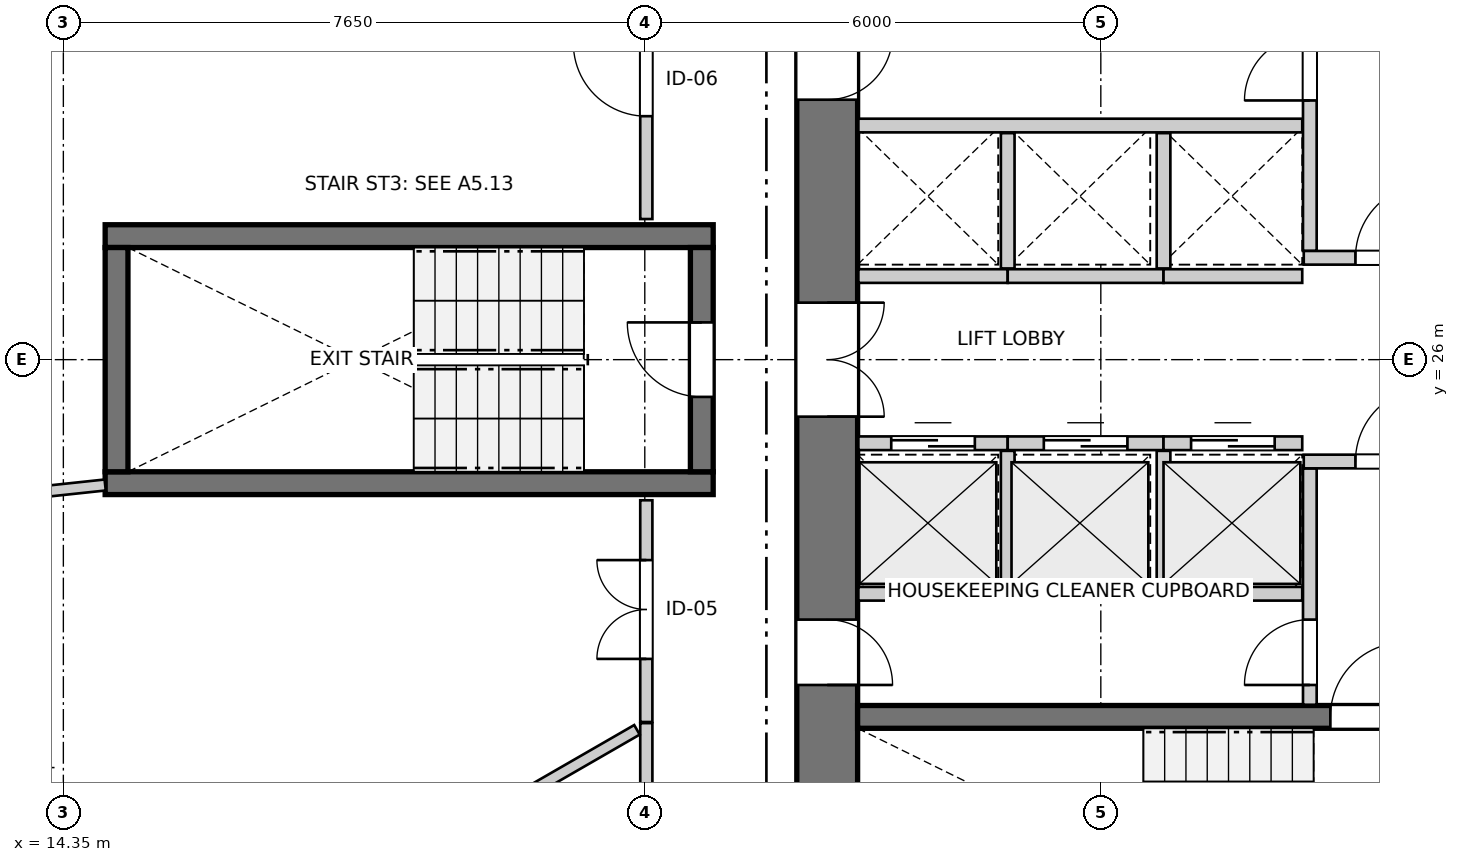
"""IFC4 building model, lengths in metres.
Left out: names, types, materials, properties, quantities, classifications, styles, units other than length and angle.
Written with IfcOpenShell. Run it as: python <this file> out.ifc"""

import sys

from ifc_helpers import new_model, si_unit, direction, frame, frame_2d, origin, place, context, subcontext, project, spatial, rectangle, extrude, source, transform, mapped, element, fill, save


model = new_model("IFC4")
c1 = context("Model", 3, precision=1e-05, world=origin(), true_north=direction((0.0, 1.0)))
c2 = subcontext(c1, "Body", "Model", "MODEL_VIEW")
j1 = project(units=[si_unit("LENGTHUNIT", "METRE"), si_unit("PLANEANGLEUNIT", "RADIAN")], contexts=[c1])
p1 = place(None, origin())
s1 = spatial("IfcSite", under=j1, at=p1, CompositionType="ELEMENT")
p2 = place(p1, origin())
s2 = spatial("IfcBuilding", under=s1, at=p2, CompositionType="ELEMENT")
p3 = place(p2, frame((0.0, 0.0, 14.2)))
s3 = spatial("IfcBuildingStorey", under=s2, at=p3, CompositionType="ELEMENT", Elevation=14.2)
p4 = place(p3, frame((24.4, 33.8, 0.0), z_axis=(0.0, 0.0, 1.0), x_axis=(0.0, -1.0, 0.0)))
e1 = element("IfcWall", 1, at=p4, inside=s3, PredefinedType="SHEAR", context=c2, shape_type="SweptSolid", body=[
    extrude(rectangle(XDim=15.6, YDim=0.8, at=frame_2d((7.8, 0.0))), origin(), (0.0, 0.0, 1.0), 2.94),
])
p5 = place(p4, frame((7.05, 0.0, 0.0)))
e2 = element("IfcOpeningElement", 2, at=p5, cuts=e1, PredefinedType="OPENING", context=c2, shape_type="SweptSolid", body=[
    extrude(rectangle(XDim=1.5, YDim=2.15, at=frame_2d((0.75, 1.075))), frame((0.0, 0.41, 0.0), z_axis=(0.0, -1.0, 0.0), x_axis=(1.0, 0.0, 0.0)), (0.0, 0.0, 1.0), 0.82),
])
p6 = place(p4, frame((3.52, 0.0, 0.0)))
e3 = element("IfcOpeningElement", 3, at=p6, cuts=e1, PredefinedType="OPENING", context=c2, shape_type="SweptSolid", body=[
    extrude(rectangle(XDim=0.86, YDim=2.05, at=frame_2d((0.43, 1.025))), frame((0.0, 0.41, 0.0), z_axis=(0.0, -1.0, 0.0), x_axis=(1.0, 0.0, 0.0)), (0.0, 0.0, 1.0), 0.82),
])
p7 = place(p4, frame((11.22, 0.0, 0.0)))
e4 = element("IfcOpeningElement", 4, at=p7, cuts=e1, PredefinedType="OPENING", context=c2, shape_type="SweptSolid", body=[
    extrude(rectangle(XDim=0.86, YDim=2.05, at=frame_2d((0.43, 1.025))), frame((0.0, 0.41, 0.0), z_axis=(0.0, -1.0, 0.0), x_axis=(1.0, 0.0, 0.0)), (0.0, 0.0, 1.0), 0.82),
])
p8 = place(p3, frame((24.8, 21.3, 0.0), z_axis=(0.0, 0.0, 1.0), x_axis=(1.0, 0.0, 0.0)))
e5 = element("IfcWall", 5, at=p8, inside=s3, PredefinedType="SHEAR", context=c2, shape_type="SweptSolid", body=[
    extrude(rectangle(XDim=11.1, YDim=0.3, at=frame_2d((5.55, 0.0))), origin(), (0.0, 0.0, 1.0), 2.94),
])
p9 = place(p8, frame((6.22, 0.0, 0.0)))
e6 = element("IfcOpeningElement", 6, at=p9, cuts=e5, PredefinedType="OPENING", context=c2, shape_type="SweptSolid", body=[
    extrude(rectangle(XDim=0.98, YDim=2.15, at=frame_2d((0.49, 1.075))), frame((0.0, 0.16, 0.0), z_axis=(0.0, -1.0, 0.0), x_axis=(1.0, 0.0, 0.0)), (0.0, 0.0, 1.0), 0.32),
])
p10 = place(p8, frame((9.15, 0.0, 0.0)))
e7 = element("IfcOpeningElement", 7, at=p10, cuts=e5, PredefinedType="OPENING", context=c2, shape_type="SweptSolid", body=[
    extrude(rectangle(XDim=1.15, YDim=2.15, at=frame_2d((0.575, 1.075))), frame((0.0, 0.16, 0.0), z_axis=(0.0, -1.0, 0.0), x_axis=(1.0, 0.0, 0.0)), (0.0, 0.0, 1.0), 0.32),
])
for number, where, z_axis, x_axis in (
    (8, (14.9, 24.375, 0.0), (0.0, 0.0, 1.0), (1.0, 0.0, 0.0)),
    (9, (22.9, 27.625, 0.0), (0.0, 0.0, 1.0), (-1.0, 0.0, 0.0)),
):
    element("IfcWall", number, at=place(p3, frame(where, z_axis=z_axis, x_axis=x_axis)), inside=s3, PredefinedType="SHEAR", context=c2, shape_type="SweptSolid", body=[
        extrude(rectangle(XDim=8.0, YDim=0.3, at=frame_2d((4.0, 0.0))), origin(), (0.0, 0.0, 1.0), 2.94),
    ])
p11 = place(p3, frame((15.05, 27.475, 0.0), z_axis=(0.0, 0.0, 1.0), x_axis=(0.0, -1.0, 0.0)))
e10 = element("IfcWall", 10, at=p11, inside=s3, PredefinedType="SHEAR", context=c2, shape_type="SweptSolid", body=[
    extrude(rectangle(XDim=2.95, YDim=0.3, at=frame_2d((1.475, 0.0))), origin(), (0.0, 0.0, 1.0), 2.94),
])
p12 = place(p3, frame((22.75, 24.525, 0.0), z_axis=(0.0, 0.0, 1.0), x_axis=(0.0, 1.0, 0.0)))
e11 = element("IfcWall", 11, at=p12, inside=s3, PredefinedType="SHEAR", context=c2, shape_type="SweptSolid", body=[
    extrude(rectangle(XDim=2.95, YDim=0.3, at=frame_2d((1.475, 0.0))), origin(), (0.0, 0.0, 1.0), 2.94),
])
p13 = place(p12, frame((0.985, 0.0, 0.0)))
e12 = element("IfcOpeningElement", 12, at=p13, cuts=e11, PredefinedType="OPENING", context=c2, shape_type="SweptSolid", body=[
    extrude(rectangle(XDim=0.98, YDim=2.15, at=frame_2d((0.49, 1.075))), frame((0.0, 0.16, 0.0), z_axis=(0.0, -1.0, 0.0), x_axis=(1.0, 0.0, 0.0)), (0.0, 0.0, 1.0), 0.32),
])
p14 = place(p3, frame((30.75, 21.46, 0.0), z_axis=(0.0, 0.0, 1.0), x_axis=(0.0, 1.0, 0.0)))
e13 = element("IfcWall", 13, at=p14, inside=s3, PredefinedType="PARTITIONING", context=c2, shape_type="SweptSolid", body=[
    extrude(rectangle(XDim=3.11, YDim=0.18, at=frame_2d((1.555, 0.0))), origin(), (0.0, 0.0, 1.0), 2.94),
])
p15 = place(p14, frame((0.26, 0.0, 0.0)))
e14 = element("IfcOpeningElement", 14, at=p15, cuts=e13, PredefinedType="OPENING", context=c2, shape_type="SweptSolid", body=[
    extrude(rectangle(XDim=0.86, YDim=2.05, at=frame_2d((0.43, 1.025))), frame((0.0, 0.1, 0.0), z_axis=(0.0, -1.0, 0.0), x_axis=(1.0, 0.0, 0.0)), (0.0, 0.0, 1.0), 0.2),
])
p16 = place(p3, frame((30.67, 24.66, 0.0), z_axis=(0.0, 0.0, 1.0), x_axis=(1.0, 0.0, 0.0)))
e15 = element("IfcWall", 15, at=p16, inside=s3, PredefinedType="PARTITIONING", context=c2, shape_type="SweptSolid", body=[
    extrude(rectangle(XDim=5.22, YDim=0.18, at=frame_2d((2.61, 0.0))), origin(), (0.0, 0.0, 1.0), 2.94),
])
p17 = place(p16, frame((0.68, 0.0, 0.0)))
e16 = element("IfcOpeningElement", 16, at=p17, cuts=e15, PredefinedType="OPENING", context=c2, shape_type="SweptSolid", body=[
    extrude(rectangle(XDim=0.98, YDim=2.15, at=frame_2d((0.49, 1.075))), frame((0.0, 0.1, 0.0), z_axis=(0.0, -1.0, 0.0), x_axis=(1.0, 0.0, 0.0)), (0.0, 0.0, 1.0), 0.2),
])
p18 = place(p3, frame((30.75, 27.43, 0.0), z_axis=(0.0, 0.0, 1.0), x_axis=(0.0, 1.0, 0.0)))
e17 = element("IfcWall", 17, at=p18, inside=s3, PredefinedType="PARTITIONING", context=c2, shape_type="SweptSolid", body=[
    extrude(rectangle(XDim=3.11, YDim=0.18, at=frame_2d((1.555, 0.0))), origin(), (0.0, 0.0, 1.0), 2.94),
])
p19 = place(p18, frame((1.98, 0.0, 0.0)))
e18 = element("IfcOpeningElement", 18, at=p19, cuts=e17, PredefinedType="OPENING", context=c2, shape_type="SweptSolid", body=[
    extrude(rectangle(XDim=0.86, YDim=2.05, at=frame_2d((0.43, 1.025))), frame((0.0, 0.1, 0.0), z_axis=(0.0, -1.0, 0.0), x_axis=(1.0, 0.0, 0.0)), (0.0, 0.0, 1.0), 0.2),
])
p20 = place(p3, frame((30.67, 27.34, 0.0), z_axis=(0.0, 0.0, 1.0), x_axis=(1.0, 0.0, 0.0)))
e19 = element("IfcWall", 19, at=p20, inside=s3, PredefinedType="PARTITIONING", context=c2, shape_type="SweptSolid", body=[
    extrude(rectangle(XDim=5.22, YDim=0.18, at=frame_2d((2.61, 0.0))), origin(), (0.0, 0.0, 1.0), 2.94),
])
p21 = place(p20, frame((0.68, 0.0, 0.0)))
e20 = element("IfcOpeningElement", 20, at=p21, cuts=e19, PredefinedType="OPENING", context=c2, shape_type="SweptSolid", body=[
    extrude(rectangle(XDim=0.98, YDim=2.15, at=frame_2d((0.49, 1.075))), frame((0.0, 0.1, 0.0), z_axis=(0.0, -1.0, 0.0), x_axis=(1.0, 0.0, 0.0)), (0.0, 0.0, 1.0), 0.2),
])
p22 = place(p3, frame((24.81, 22.92, 0.0), z_axis=(0.0, 0.0, 1.0), x_axis=(1.0, 0.0, 0.0)))
e21 = element("IfcWall", 21, at=p22, inside=s3, PredefinedType="PARTITIONING", context=c2, shape_type="SweptSolid", body=[
    extrude(rectangle(XDim=5.84, YDim=0.18, at=frame_2d((2.92, 0.0))), origin(), (0.0, 0.0, 1.0), 2.94),
])
p23 = place(p3, frame((24.81, 24.9, 0.0), z_axis=(0.0, 0.0, 1.0), x_axis=(1.0, 0.0, 0.0)))
e22 = element("IfcWall", 22, at=p23, inside=s3, PredefinedType="PARTITIONING", context=c2, shape_type="SweptSolid", body=[
    extrude(rectangle(XDim=1.965, YDim=0.18, at=frame_2d((0.982, 0.0))), origin(), (0.0, 0.0, 1.0), 2.94),
])
p24 = place(p23, frame((0.433, 0.0, 0.0)))
e23 = element("IfcOpeningElement", 23, at=p24, cuts=e22, PredefinedType="OPENING", context=c2, shape_type="SweptSolid", body=[
    extrude(rectangle(XDim=1.1, YDim=2.15, at=frame_2d((0.55, 1.075))), frame((0.0, 0.1, 0.0), z_axis=(0.0, -1.0, 0.0), x_axis=(1.0, 0.0, 0.0)), (0.0, 0.0, 1.0), 0.2),
])
p25 = place(p3, frame((26.775, 24.9, 0.0), z_axis=(0.0, 0.0, 1.0), x_axis=(1.0, 0.0, 0.0)))
e24 = element("IfcWall", 24, at=p25, inside=s3, PredefinedType="PARTITIONING", context=c2, shape_type="SweptSolid", body=[
    extrude(rectangle(XDim=2.05, YDim=0.18, at=frame_2d((1.025, 0.0))), origin(), (0.0, 0.0, 1.0), 2.94),
])
p26 = place(p25, frame((0.475, 0.0, 0.0)))
e25 = element("IfcOpeningElement", 25, at=p26, cuts=e24, PredefinedType="OPENING", context=c2, shape_type="SweptSolid", body=[
    extrude(rectangle(XDim=1.1, YDim=2.15, at=frame_2d((0.55, 1.075))), frame((0.0, 0.1, 0.0), z_axis=(0.0, -1.0, 0.0), x_axis=(1.0, 0.0, 0.0)), (0.0, 0.0, 1.0), 0.2),
])
p27 = place(p3, frame((26.775, 23.02, 0.0), z_axis=(0.0, 0.0, 1.0), x_axis=(0.0, 1.0, 0.0)))
e26 = element("IfcWall", 26, at=p27, inside=s3, PredefinedType="PARTITIONING", context=c2, shape_type="SweptSolid", body=[
    extrude(rectangle(XDim=1.78, YDim=0.18, at=frame_2d((0.89, 0.0))), origin(), (0.0, 0.0, 1.0), 2.94),
])
p28 = place(p3, frame((28.825, 24.9, 0.0), z_axis=(0.0, 0.0, 1.0), x_axis=(1.0, 0.0, 0.0)))
e27 = element("IfcWall", 27, at=p28, inside=s3, PredefinedType="PARTITIONING", context=c2, shape_type="SweptSolid", body=[
    extrude(rectangle(XDim=1.825, YDim=0.18, at=frame_2d((0.913, 0.0))), origin(), (0.0, 0.0, 1.0), 2.94),
])
p29 = place(p28, frame((0.363, 0.0, 0.0)))
e28 = element("IfcOpeningElement", 28, at=p29, cuts=e27, PredefinedType="OPENING", context=c2, shape_type="SweptSolid", body=[
    extrude(rectangle(XDim=1.1, YDim=2.15, at=frame_2d((0.55, 1.075))), frame((0.0, 0.1, 0.0), z_axis=(0.0, -1.0, 0.0), x_axis=(1.0, 0.0, 0.0)), (0.0, 0.0, 1.0), 0.2),
])
p30 = place(p3, frame((28.825, 23.02, 0.0), z_axis=(0.0, 0.0, 1.0), x_axis=(0.0, 1.0, 0.0)))
e29 = element("IfcWall", 29, at=p30, inside=s3, PredefinedType="PARTITIONING", context=c2, shape_type="SweptSolid", body=[
    extrude(rectangle(XDim=1.78, YDim=0.18, at=frame_2d((0.89, 0.0))), origin(), (0.0, 0.0, 1.0), 2.94),
])
p31 = place(p3, frame((24.81, 29.08, 0.0), z_axis=(0.0, 0.0, 1.0), x_axis=(1.0, 0.0, 0.0)))
e30 = element("IfcWall", 30, at=p31, inside=s3, PredefinedType="PARTITIONING", context=c2, shape_type="SweptSolid", body=[
    extrude(rectangle(XDim=5.84, YDim=0.18, at=frame_2d((2.92, 0.0))), origin(), (0.0, 0.0, 1.0), 2.94),
])
p32 = place(p3, frame((24.81, 27.1, 0.0), z_axis=(0.0, 0.0, 1.0), x_axis=(1.0, 0.0, 0.0)))
e31 = element("IfcWall", 31, at=p32, inside=s3, PredefinedType="PARTITIONING", context=c2, shape_type="SweptSolid", body=[
    extrude(rectangle(XDim=1.965, YDim=0.18, at=frame_2d((0.982, 0.0))), origin(), (0.0, 0.0, 1.0), 2.94),
])
p33 = place(p3, frame((26.775, 27.1, 0.0), z_axis=(0.0, 0.0, 1.0), x_axis=(1.0, 0.0, 0.0)))
e32 = element("IfcWall", 32, at=p33, inside=s3, PredefinedType="PARTITIONING", context=c2, shape_type="SweptSolid", body=[
    extrude(rectangle(XDim=2.05, YDim=0.18, at=frame_2d((1.025, 0.0))), origin(), (0.0, 0.0, 1.0), 2.94),
])
p34 = place(p3, frame((26.775, 27.2, 0.0), z_axis=(0.0, 0.0, 1.0), x_axis=(0.0, 1.0, 0.0)))
e33 = element("IfcWall", 33, at=p34, inside=s3, PredefinedType="PARTITIONING", context=c2, shape_type="SweptSolid", body=[
    extrude(rectangle(XDim=1.78, YDim=0.18, at=frame_2d((0.89, 0.0))), origin(), (0.0, 0.0, 1.0), 2.94),
])
p35 = place(p3, frame((28.825, 27.1, 0.0), z_axis=(0.0, 0.0, 1.0), x_axis=(1.0, 0.0, 0.0)))
e34 = element("IfcWall", 34, at=p35, inside=s3, PredefinedType="PARTITIONING", context=c2, shape_type="SweptSolid", body=[
    extrude(rectangle(XDim=1.825, YDim=0.18, at=frame_2d((0.913, 0.0))), origin(), (0.0, 0.0, 1.0), 2.94),
])
p36 = place(p3, frame((28.825, 27.2, 0.0), z_axis=(0.0, 0.0, 1.0), x_axis=(0.0, 1.0, 0.0)))
e35 = element("IfcWall", 35, at=p36, inside=s3, PredefinedType="PARTITIONING", context=c2, shape_type="SweptSolid", body=[
    extrude(rectangle(XDim=1.78, YDim=0.18, at=frame_2d((0.89, 0.0))), origin(), (0.0, 0.0, 1.0), 2.94),
])
p37 = place(p3, frame((22.02, 27.85, 0.0), z_axis=(0.0, 0.0, 1.0), x_axis=(0.0, 1.0, 0.0)))
e36 = element("IfcWall", 36, at=p37, inside=s3, PredefinedType="PARTITIONING", context=c2, shape_type="SweptSolid", body=[
    extrude(rectangle(XDim=3.625, YDim=0.16, at=frame_2d((1.812, 0.0))), origin(), (0.0, 0.0, 1.0), 2.94),
])
p38 = place(p37, frame((1.353, 0.0, 0.0)))
e37 = element("IfcOpeningElement", 37, at=p38, cuts=e36, PredefinedType="OPENING", context=c2, shape_type="SweptSolid", body=[
    extrude(rectangle(XDim=0.96, YDim=2.1, at=frame_2d((0.48, 1.05))), frame((0.0, 0.09, 0.0), z_axis=(0.0, -1.0, 0.0), x_axis=(1.0, 0.0, 0.0)), (0.0, 0.0, 1.0), 0.18),
])
p39 = place(p3, frame((22.02, 18.014, 0.0), z_axis=(0.0, 0.0, 1.0), x_axis=(0.0, 1.0, 0.0)))
e38 = element("IfcWall", 38, at=p39, inside=s3, PredefinedType="PARTITIONING", context=c2, shape_type="SweptSolid", body=[
    extrude(rectangle(XDim=3.204, YDim=0.16, at=frame_2d((1.602, 0.0))), origin(), (0.0, 0.0, 1.0), 2.94),
])
p40 = place(p39, frame((1.144, 0.0, 0.0)))
e39 = element("IfcOpeningElement", 39, at=p40, cuts=e38, PredefinedType="OPENING", context=c2, shape_type="SweptSolid", body=[
    extrude(rectangle(XDim=0.92, YDim=2.1, at=frame_2d((0.46, 1.05))), frame((0.0, 0.09, 0.0), z_axis=(0.0, -1.0, 0.0), x_axis=(1.0, 0.0, 0.0)), (0.0, 0.0, 1.0), 0.18),
])
p41 = place(p3, frame((22.02, 21.233, 0.0), z_axis=(0.0, 0.0, 1.0), x_axis=(0.0, 1.0, 0.0)))
e40 = element("IfcWall", 40, at=p41, inside=s3, PredefinedType="PARTITIONING", context=c2, shape_type="SweptSolid", body=[
    extrude(rectangle(XDim=2.917, YDim=0.16, at=frame_2d((1.458, 0.0))), origin(), (0.0, 0.0, 1.0), 2.94),
])
p42 = place(p41, frame((0.83, 0.0, 0.0)))
e41 = element("IfcOpeningElement", 41, at=p42, cuts=e40, PredefinedType="OPENING", context=c2, shape_type="SweptSolid", body=[
    extrude(rectangle(XDim=1.3, YDim=2.1, at=frame_2d((0.65, 1.05))), frame((0.0, 0.09, 0.0), z_axis=(0.0, -1.0, 0.0), x_axis=(1.0, 0.0, 0.0)), (0.0, 0.0, 1.0), 0.18),
])
p43 = place(p3, frame((4.231, 23.212, 0.0), z_axis=(0.0, 0.0, 1.0), x_axis=(0.994353055544, 0.106122575023, 0.0)))
e42 = element("IfcWall", 42, at=p43, inside=s3, PredefinedType="PARTITIONING", context=c2, shape_type="SweptSolid", body=[
    extrude(rectangle(XDim=10.73, YDim=0.145, at=frame_2d((5.365, 0.0))), origin(), (0.0, 0.0, 1.0), 2.94),
])
p44 = place(p3, frame((17.524, 18.61, 0.0), z_axis=(0.0, 0.0, 1.0), x_axis=(0.866454437228, 0.499256154903, 0.0)))
e43 = element("IfcWall", 43, at=p44, inside=s3, PredefinedType="PARTITIONING", context=c2, shape_type="SweptSolid", body=[
    extrude(rectangle(XDim=5.047, YDim=0.145, at=frame_2d((2.523, 0.0))), origin(), (0.0, 0.0, 1.0), 2.94),
])
m1 = source(origin(), c2, "Body", "SweptSolid", [
    extrude(rectangle(XDim=0.98, YDim=2.15, at=frame_2d((0.49, 1.075))), frame((0.0, 0.025, 0.0), z_axis=(0.0, -1.0, 0.0), x_axis=(1.0, 0.0, 0.0)), (0.0, 0.0, 1.0), 0.05),
])
p45 = place(p9, origin())
e44 = element("IfcDoor", 44, at=p45, inside=s3, OperationType="SINGLE_SWING_RIGHT", PredefinedType="DOOR", context=c2, shape_type="MappedRepresentation", body=[
    mapped(m1, transform((0.0, 0.0, 0.0), x_axis=(1.0, 0.0, 0.0), y_axis=(0.0, 1.0, 0.0), z_axis=(0.0, 0.0, 1.0), scale=1.0)),
])
fill(e6, e44)
p46 = place(p13, origin())
e45 = element("IfcDoor", 45, at=p46, inside=s3, OperationType="SINGLE_SWING_RIGHT", PredefinedType="DOOR", context=c2, shape_type="MappedRepresentation", body=[
    mapped(m1, transform((0.0, 0.0, 0.0), x_axis=(1.0, 0.0, 0.0), y_axis=(0.0, 1.0, 0.0), z_axis=(0.0, 0.0, 1.0), scale=1.0)),
])
fill(e12, e45)
m2 = source(origin(), c2, "Body", "SweptSolid", [
    extrude(rectangle(XDim=1.5, YDim=2.15, at=frame_2d((0.75, 1.075))), frame((0.0, 0.025, 0.0), z_axis=(0.0, -1.0, 0.0), x_axis=(1.0, 0.0, 0.0)), (0.0, 0.0, 1.0), 0.05),
])
p47 = place(p5, origin())
e46 = element("IfcDoor", 46, at=p47, inside=s3, OperationType="DOUBLE_DOOR_SINGLE_SWING", PredefinedType="DOOR", context=c2, shape_type="MappedRepresentation", body=[
    mapped(m2, transform((0.0, 0.0, 0.0), x_axis=(1.0, 0.0, 0.0), y_axis=(0.0, 1.0, 0.0), z_axis=(0.0, 0.0, 1.0), scale=1.0)),
])
fill(e2, e46)
m3 = source(origin(), c2, "Body", "SweptSolid", [
    extrude(rectangle(XDim=0.86, YDim=2.05, at=frame_2d((0.43, 1.025))), frame((0.0, 0.025, 0.0), z_axis=(0.0, -1.0, 0.0), x_axis=(1.0, 0.0, 0.0)), (0.0, 0.0, 1.0), 0.05),
])
p48 = place(p6, origin())
e47 = element("IfcDoor", 47, at=p48, inside=s3, OperationType="SINGLE_SWING_LEFT", PredefinedType="DOOR", context=c2, shape_type="MappedRepresentation", body=[
    mapped(m3, transform((0.0, 0.0, 0.0), x_axis=(1.0, 0.0, 0.0), y_axis=(0.0, 1.0, 0.0), z_axis=(0.0, 0.0, 1.0), scale=1.0)),
])
fill(e3, e47)
p49 = place(p7, origin())
e48 = element("IfcDoor", 48, at=p49, inside=s3, OperationType="SINGLE_SWING_RIGHT", PredefinedType="DOOR", context=c2, shape_type="MappedRepresentation", body=[
    mapped(m3, transform((0.0, 0.0, 0.0), x_axis=(1.0, 0.0, 0.0), y_axis=(0.0, 1.0, 0.0), z_axis=(0.0, 0.0, 1.0), scale=1.0)),
])
fill(e4, e48)
p50 = place(p15, origin())
e49 = element("IfcDoor", 49, at=p50, inside=s3, OperationType="SINGLE_SWING_LEFT", PredefinedType="DOOR", context=c2, shape_type="MappedRepresentation", body=[
    mapped(m3, transform((0.0, 0.0, 0.0), x_axis=(1.0, 0.0, 0.0), y_axis=(0.0, 1.0, 0.0), z_axis=(0.0, 0.0, 1.0), scale=1.0)),
])
fill(e14, e49)
p51 = place(p17, origin())
e50 = element("IfcDoor", 50, at=p51, inside=s3, OperationType="SINGLE_SWING_RIGHT", PredefinedType="DOOR", context=c2, shape_type="MappedRepresentation", body=[
    mapped(m1, transform((0.0, 0.0, 0.0), x_axis=(1.0, 0.0, 0.0), y_axis=(0.0, 1.0, 0.0), z_axis=(0.0, 0.0, 1.0), scale=1.0)),
])
fill(e16, e50)
p52 = place(p19, origin())
e51 = element("IfcDoor", 51, at=p52, inside=s3, OperationType="SINGLE_SWING_LEFT", PredefinedType="DOOR", context=c2, shape_type="MappedRepresentation", body=[
    mapped(m3, transform((0.0, 0.0, 0.0), x_axis=(1.0, 0.0, 0.0), y_axis=(0.0, 1.0, 0.0), z_axis=(0.0, 0.0, 1.0), scale=1.0)),
])
fill(e18, e51)
p53 = place(p21, origin())
e52 = element("IfcDoor", 52, at=p53, inside=s3, OperationType="SINGLE_SWING_RIGHT", PredefinedType="DOOR", context=c2, shape_type="MappedRepresentation", body=[
    mapped(m1, transform((0.0, 0.0, 0.0), x_axis=(1.0, 0.0, 0.0), y_axis=(0.0, 1.0, 0.0), z_axis=(0.0, 0.0, 1.0), scale=1.0)),
])
fill(e20, e52)
m4 = source(origin(), c2, "Body", "SweptSolid", [
    extrude(rectangle(XDim=1.1, YDim=2.15, at=frame_2d((0.55, 1.075))), frame((0.0, 0.025, 0.0), z_axis=(0.0, -1.0, 0.0), x_axis=(1.0, 0.0, 0.0)), (0.0, 0.0, 1.0), 0.05),
])
p54 = place(p24, origin())
e53 = element("IfcDoor", 53, at=p54, inside=s3, OperationType="DOUBLE_DOOR_SLIDING", PredefinedType="DOOR", context=c2, shape_type="MappedRepresentation", body=[
    mapped(m4, transform((0.0, 0.0, 0.0), x_axis=(1.0, 0.0, 0.0), y_axis=(0.0, 1.0, 0.0), z_axis=(0.0, 0.0, 1.0), scale=1.0)),
])
fill(e23, e53)
p55 = place(p26, origin())
e54 = element("IfcDoor", 54, at=p55, inside=s3, OperationType="DOUBLE_DOOR_SLIDING", PredefinedType="DOOR", context=c2, shape_type="MappedRepresentation", body=[
    mapped(m4, transform((0.0, 0.0, 0.0), x_axis=(1.0, 0.0, 0.0), y_axis=(0.0, 1.0, 0.0), z_axis=(0.0, 0.0, 1.0), scale=1.0)),
])
fill(e25, e54)
p56 = place(p29, origin())
e55 = element("IfcDoor", 55, at=p56, inside=s3, OperationType="DOUBLE_DOOR_SLIDING", PredefinedType="DOOR", context=c2, shape_type="MappedRepresentation", body=[
    mapped(m4, transform((0.0, 0.0, 0.0), x_axis=(1.0, 0.0, 0.0), y_axis=(0.0, 1.0, 0.0), z_axis=(0.0, 0.0, 1.0), scale=1.0)),
])
fill(e28, e55)
m5 = source(origin(), c2, "Body", "SweptSolid", [
    extrude(rectangle(XDim=0.96, YDim=2.1, at=frame_2d((0.48, 1.05))), frame((0.0, 0.025, 0.0), z_axis=(0.0, -1.0, 0.0), x_axis=(1.0, 0.0, 0.0)), (0.0, 0.0, 1.0), 0.05),
])
p57 = place(p38, origin())
e56 = element("IfcDoor", 56, at=p57, inside=s3, OperationType="SINGLE_SWING_RIGHT", PredefinedType="DOOR", context=c2, shape_type="MappedRepresentation", body=[
    mapped(m5, transform((0.0, 0.0, 0.0), x_axis=(1.0, 0.0, 0.0), y_axis=(0.0, 1.0, 0.0), z_axis=(0.0, 0.0, 1.0), scale=1.0)),
])
fill(e37, e56)
m6 = source(origin(), c2, "Body", "SweptSolid", [
    extrude(rectangle(XDim=1.3, YDim=2.1, at=frame_2d((0.65, 1.05))), frame((0.0, 0.025, 0.0), z_axis=(0.0, -1.0, 0.0), x_axis=(1.0, 0.0, 0.0)), (0.0, 0.0, 1.0), 0.05),
])
p58 = place(p42, origin())
e57 = element("IfcDoor", 57, at=p58, inside=s3, OperationType="DOUBLE_DOOR_SINGLE_SWING", PredefinedType="DOOR", context=c2, shape_type="MappedRepresentation", body=[
    mapped(m6, transform((0.0, 0.0, 0.0), x_axis=(1.0, 0.0, 0.0), y_axis=(0.0, 1.0, 0.0), z_axis=(0.0, 0.0, 1.0), scale=1.0)),
])
fill(e41, e57)
save(model, sys.argv[1])
